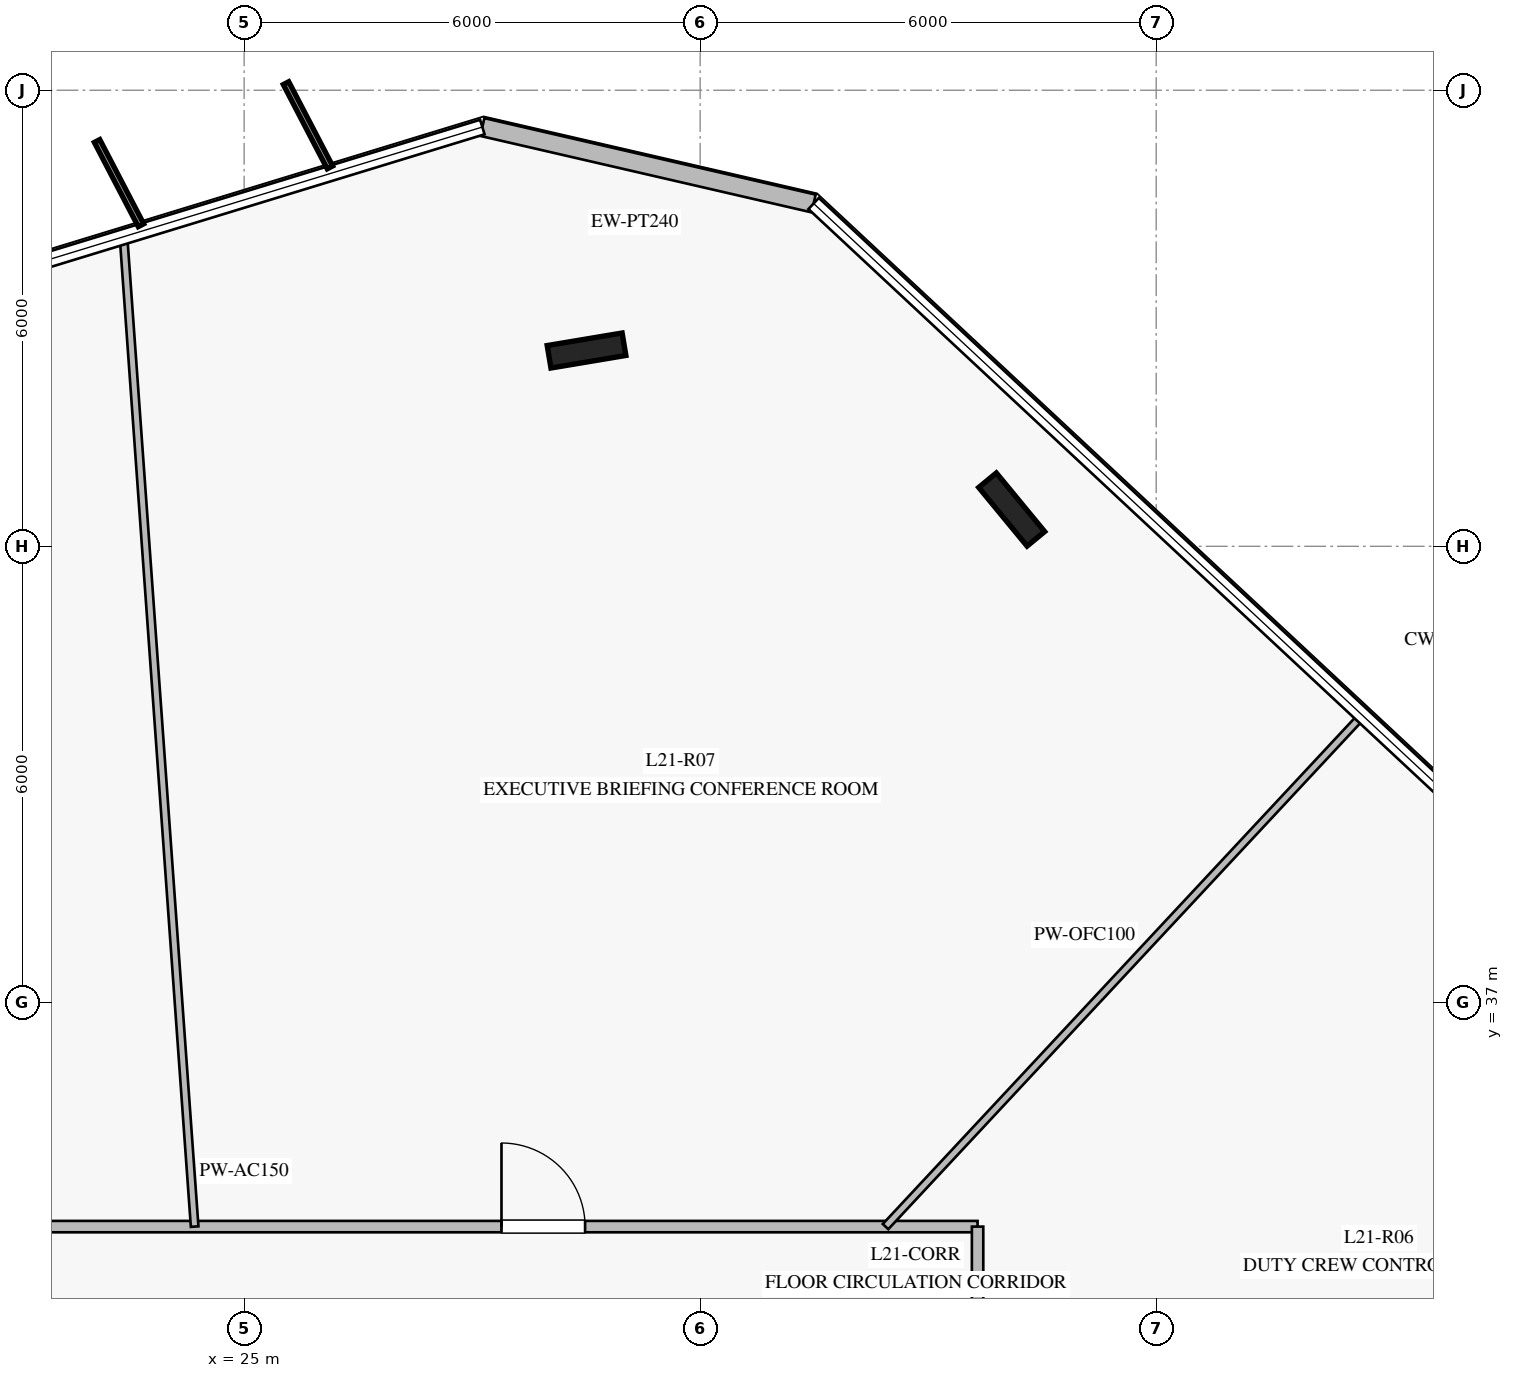
"""IFC4 building model, lengths in metres.
Left out: names, types, materials, properties, quantities, classifications, styles, units other than length and angle.
Written with IfcOpenShell. Run it as: python <this file> out.ifc"""

import sys

from ifc_helpers import new_model, si_unit, direction, frame, frame_2d, origin, origin_2d, place, context, subcontext, project, spatial, rectangle, i_section, extrude, element, fill, save


model = new_model("IFC4")
c1 = context("Model", 3, precision=1e-05, world=origin(), true_north=direction((0.0, 1.0)))
c2 = subcontext(c1, "Body", "Model", "MODEL_VIEW")
j1 = project(units=[si_unit("LENGTHUNIT", "METRE"), si_unit("PLANEANGLEUNIT", "RADIAN")], contexts=[c1])
p1 = place(None, origin())
s1 = spatial("IfcSite", under=j1, at=p1, CompositionType="ELEMENT")
p2 = place(p1, origin())
s2 = spatial("IfcBuilding", under=s1, at=p2, CompositionType="ELEMENT")
p3 = place(p2, frame((0.0, 0.0, 88.0)))
s3 = spatial("IfcBuildingStorey", under=s2, at=p3, CompositionType="ELEMENT", Elevation=88.0)
for number, where, z_axis, x_axis in (
    (1, (35.099, 43.484, 0.0), (0.0, 0.0, 1.0), (-0.636, 0.772, 0.0)),
    (2, (29.505, 45.576, 0.0), (0.0, 0.0, 1.0), (0.986, 0.165, 0.0)),
):
    element("IfcColumn", number, at=place(p3, frame(where, z_axis=z_axis, x_axis=x_axis)), inside=s3, PredefinedType="COLUMN", context=c2, shape_type="SweptSolid", body=[
        extrude(i_section(OverallWidth=0.3, OverallDepth=1.0, WebThickness=0.019, FlangeThickness=0.036, at=origin_2d()), origin(), (0.0, 0.0, 1.0), 4.0),
    ])
p4 = place(p3, frame((32.493, 47.51, 0.0), z_axis=(0.0, 0.0, 1.0), x_axis=(-0.974381076881, 0.224903350388, 0.0)))
e3 = element("IfcWall", 3, at=p4, inside=s3, PredefinedType="STANDARD", context=c2, shape_type="SweptSolid", body=[
    extrude(rectangle(XDim=4.473, YDim=0.24, at=frame_2d((2.237, 0.0))), origin(), (0.0, 0.0, 1.0), 3.7),
])
p5 = place(p3, frame((15.35, 34.05, 0.0), z_axis=(0.0, 0.0, 1.0), x_axis=(1.0, 0.0, 0.0)))
e4 = element("IfcWall", 4, at=p5, inside=s3, PredefinedType="PARTITIONING", context=c2, shape_type="SweptSolid", body=[
    extrude(rectangle(XDim=19.3, YDim=0.15, at=frame_2d((9.65, 0.0))), origin(), (0.0, 0.0, 1.0), 3.15),
])
p6 = place(p5, frame((13.036, 0.0, 0.0)))
e5 = element("IfcOpeningElement", 5, at=p6, cuts=e4, PredefinedType="OPENING", context=c2, shape_type="SweptSolid", body=[
    extrude(rectangle(XDim=1.1, YDim=2.2, at=frame_2d((0.55, 1.1))), frame((0.0, 0.085, 0.0), z_axis=(0.0, -1.0, 0.0), x_axis=(1.0, 0.0, 0.0)), (0.0, 0.0, 1.0), 0.17),
])
p7 = place(p5, frame((4.716, 0.0, 0.0)))
e6 = element("IfcOpeningElement", 6, at=p7, cuts=e4, PredefinedType="OPENING", context=c2, shape_type="SweptSolid", body=[
    extrude(rectangle(XDim=1.1, YDim=2.2, at=frame_2d((0.55, 1.1))), frame((0.0, 0.085, 0.0), z_axis=(0.0, -1.0, 0.0), x_axis=(1.0, 0.0, 0.0)), (0.0, 0.0, 1.0), 0.17),
])
p8 = place(p3, frame((34.65, 34.05, 0.0), z_axis=(0.0, 0.0, 1.0), x_axis=(0.0, -1.0, 0.0)))
e7 = element("IfcWall", 7, at=p8, inside=s3, PredefinedType="PARTITIONING", context=c2, shape_type="SweptSolid", body=[
    extrude(rectangle(XDim=18.1, YDim=0.15, at=frame_2d((9.05, 0.0))), origin(), (0.0, 0.0, 1.0), 3.15),
])
p9 = place(p8, frame((15.116, 0.0, 0.0)))
e8 = element("IfcOpeningElement", 8, at=p9, cuts=e7, PredefinedType="OPENING", context=c2, shape_type="SweptSolid", body=[
    extrude(rectangle(XDim=1.1, YDim=2.2, at=frame_2d((0.55, 1.1))), frame((0.0, 0.085, 0.0), z_axis=(0.0, -1.0, 0.0), x_axis=(1.0, 0.0, 0.0)), (0.0, 0.0, 1.0), 0.17),
])
p10 = place(p8, frame((9.862, 0.0, 0.0)))
e9 = element("IfcOpeningElement", 9, at=p10, cuts=e7, PredefinedType="OPENING", context=c2, shape_type="SweptSolid", body=[
    extrude(rectangle(XDim=1.1, YDim=2.2, at=frame_2d((0.55, 1.1))), frame((0.0, 0.085, 0.0), z_axis=(0.0, -1.0, 0.0), x_axis=(1.0, 0.0, 0.0)), (0.0, 0.0, 1.0), 0.17),
])
p11 = place(p8, frame((3.162, 0.0, 0.0)))
e10 = element("IfcOpeningElement", 10, at=p11, cuts=e7, PredefinedType="OPENING", context=c2, shape_type="SweptSolid", body=[
    extrude(rectangle(XDim=1.1, YDim=2.2, at=frame_2d((0.55, 1.1))), frame((0.0, 0.085, 0.0), z_axis=(0.0, -1.0, 0.0), x_axis=(1.0, 0.0, 0.0)), (0.0, 0.0, 1.0), 0.17),
])
p12 = place(p3, frame((33.439, 34.05, 0.0), z_axis=(0.0, 0.0, 1.0), x_axis=(0.682067130349, 0.731289566244, 0.0)))
e11 = element("IfcWall", 11, at=p12, inside=s3, PredefinedType="MOVABLE", context=c2, shape_type="SweptSolid", body=[
    extrude(rectangle(XDim=9.181, YDim=0.1, at=frame_2d((4.59, 0.0))), origin(), (0.0, 0.0, 1.0), 3.0),
])
p13 = place(p3, frame((24.349, 34.05, 0.0), z_axis=(0.0, 0.0, 1.0), x_axis=(-0.071715443753, 0.997425132593, 0.0)))
e12 = element("IfcWall", 12, at=p13, inside=s3, PredefinedType="MOVABLE", context=c2, shape_type="SweptSolid", body=[
    extrude(rectangle(XDim=13.039, YDim=0.1, at=frame_2d((6.519, 0.0))), origin(), (0.0, 0.0, 1.0), 3.0),
])
p14 = place(p6, origin())
e13 = element("IfcDoor", 13, at=p14, inside=s3, OperationType="SINGLE_SWING_LEFT", PredefinedType="DOOR", context=c2, shape_type="SweptSolid", body=[
    extrude(rectangle(XDim=1.1, YDim=2.2, at=frame_2d((0.55, 1.1))), frame((0.0, 0.025, 0.0), z_axis=(0.0, -1.0, 0.0), x_axis=(1.0, 0.0, 0.0)), (0.0, 0.0, 1.0), 0.05),
])
fill(e5, e13)
save(model, sys.argv[1])
